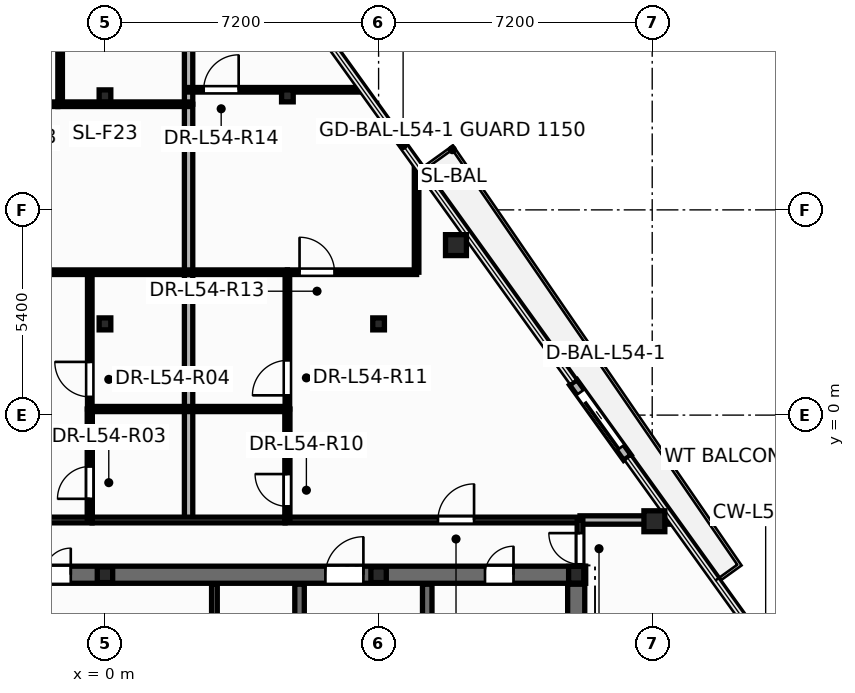
"""IFC4 building model, lengths in metres.
Left out: names, types, materials, properties, quantities, classifications, styles, units other than length and angle.
Written with IfcOpenShell. Run it as: python <this file> out.ifc"""

import sys

from ifc_helpers import new_model, si_unit, direction, frame, frame_2d, origin, origin_2d, place, context, subcontext, project, spatial, rectangle, hollow_circle, i_section, extrude, element, fill, save


model = new_model("IFC4")
c1 = context("Model", 3, precision=1e-05, world=origin(), true_north=direction((0.0, 1.0)))
c2 = subcontext(c1, "Body", "Model", "MODEL_VIEW")
j1 = project(units=[si_unit("LENGTHUNIT", "METRE"), si_unit("PLANEANGLEUNIT", "RADIAN")], contexts=[c1])
p1 = place(None, origin())
s1 = spatial("IfcSite", under=j1, at=p1, CompositionType="ELEMENT")
p2 = place(p1, origin())
s2 = spatial("IfcBuilding", under=s1, at=p2, CompositionType="ELEMENT")
p3 = place(p2, frame((0.0, 0.0, 207.3)))
s3 = spatial("IfcBuildingStorey", under=s2, at=p3, CompositionType="ELEMENT", Elevation=207.3)
for number, where, z_axis, x_axis in (
    (1, (14.457, -2.793, 0.0), (0.0, 0.0, 1.0), (1.0, 0.0, 0.0)),
    (2, (9.236, 4.473, 0.0), (0.0, 0.0, 1.0), (1.0, 0.0, 0.0)),
):
    element("IfcColumn", number, at=place(p3, frame(where, z_axis=z_axis, x_axis=x_axis)), inside=s3, PredefinedType="COLUMN", context=c2, shape_type="SweptSolid", body=[
        extrude(hollow_circle(Radius=0.275, WallThickness=0.024, at=origin_2d()), origin(), (0.0, 0.0, 1.0), 3.6),
    ])
p4 = place(p3, frame((12.4, -4.2, 0.0), z_axis=(0.0, 0.0, 1.0), x_axis=(1.0, 0.0, 0.0)))
e3 = element("IfcColumn", 3, at=p4, inside=s3, PredefinedType="COLUMN", context=c2, shape_type="SweptSolid", body=[
    extrude(i_section(OverallWidth=0.4, OverallDepth=0.44, WebThickness=0.028, FlangeThickness=0.04, at=origin_2d()), origin(), (0.0, 0.0, 1.0), 3.6),
])
for number, where, z_axis, x_axis in (
    (4, (0.0, -4.2, 0.0), (0.0, 0.0, 1.0), (1.0, 0.0, 0.0)),
    (5, (7.2, -4.2, 0.0), (0.0, 0.0, 1.0), (1.0, 0.0, 0.0)),
):
    element("IfcColumn", number, at=place(p3, frame(where, z_axis=z_axis, x_axis=x_axis)), inside=s3, PredefinedType="PILASTER", context=c2, shape_type="SweptSolid", body=[
        extrude(i_section(OverallWidth=0.405, OverallDepth=0.414, WebThickness=0.022, FlangeThickness=0.032, at=origin_2d()), origin(), (0.0, 0.0, 1.0), 3.6),
    ])
for number, where, z_axis, x_axis in (
    (6, (0.0, 2.4, 0.0), (0.0, 0.0, 1.0), (1.0, 0.0, 0.0)),
    (7, (7.2, 2.4, 0.0), (0.0, 0.0, 1.0), (1.0, 0.0, 0.0)),
    (8, (0.0, 8.4, 0.0), (0.0, 0.0, 1.0), (1.0, 0.0, 0.0)),
    (9, (4.8, 8.4, 0.0), (0.0, 0.0, 1.0), (1.0, 0.0, 0.0)),
):
    element("IfcColumn", number, at=place(p3, frame(where, z_axis=z_axis, x_axis=x_axis)), inside=s3, PredefinedType="COLUMN", context=c2, shape_type="SweptSolid", body=[
        extrude(i_section(OverallWidth=0.307, OverallDepth=0.314, WebThickness=0.012, FlangeThickness=0.019, at=origin_2d()), origin(), (0.0, 0.0, 1.0), 3.6),
    ])
p5 = place(p3, frame((13.747, -1.12, -0.015), z_axis=(0.0, 0.0, 1.0), x_axis=(-0.58349791381, 0.812114637585, 0.0)))
e10 = element("IfcWall", 10, at=p5, inside=s3, PredefinedType="STANDARD", context=c2, shape_type="SweptSolid", body=[
    extrude(rectangle(XDim=2.44, YDim=0.24, at=frame_2d((1.22, 0.0))), origin(), (0.0, 0.0, 1.0), 2.802),
])
p6 = place(p5, frame((0.32, 0.0, 0.015)))
e11 = element("IfcOpeningElement", 11, at=p6, cuts=e10, PredefinedType="OPENING", context=c2, shape_type="SweptSolid", body=[
    extrude(rectangle(XDim=1.806, YDim=2.204, at=frame_2d((0.9, 1.102))), frame((0.0, 0.13, 0.0), z_axis=(0.0, -1.0, 0.0), x_axis=(1.0, 0.0, 0.0)), (0.0, 0.0, 1.0), 0.26),
])
p7 = place(p3, frame((2.88, -5.6, 0.0), z_axis=(0.0, 0.0, 1.0), x_axis=(0.0, 1.0, 0.0)))
e12 = element("IfcWall", 12, at=p7, inside=s3, PredefinedType="PARTITIONING", context=c2, shape_type="SweptSolid", body=[
    extrude(rectangle(XDim=1.15, YDim=0.15, at=frame_2d((0.575, 0.0))), origin(), (0.0, 0.0, 1.0), 3.345),
])
p8 = place(p3, frame((-12.65, -4.2, 0.0), z_axis=(0.0, 0.0, 1.0), x_axis=(1.0, 0.0, 0.0)))
e13 = element("IfcWall", 13, at=p8, inside=s3, PredefinedType="SHEAR", context=c2, shape_type="SweptSolid", body=[
    extrude(rectangle(XDim=25.3, YDim=0.45, at=frame_2d((12.65, 0.0))), origin(), (0.0, 0.0, 1.0), 3.6),
])
p9 = place(p8, frame((1.85, 0.0, 0.0)))
e14 = element("IfcOpeningElement", 14, at=p9, cuts=e13, PredefinedType="OPENING", context=c2, shape_type="SweptSolid", body=[
    extrude(rectangle(XDim=0.756, YDim=2.054, at=frame_2d((0.375, 1.027))), frame((0.0, 0.235, 0.0), z_axis=(0.0, -1.0, 0.0), x_axis=(1.0, 0.0, 0.0)), (0.0, 0.0, 1.0), 0.47),
])
p10 = place(p8, frame((22.65, 0.0, 0.0)))
e15 = element("IfcOpeningElement", 15, at=p10, cuts=e13, PredefinedType="OPENING", context=c2, shape_type="SweptSolid", body=[
    extrude(rectangle(XDim=0.756, YDim=2.054, at=frame_2d((0.375, 1.027))), frame((0.0, 0.235, 0.0), z_axis=(0.0, -1.0, 0.0), x_axis=(1.0, 0.0, 0.0)), (0.0, 0.0, 1.0), 0.47),
])
p11 = place(p8, frame((5.85, 0.0, 0.0)))
e16 = element("IfcOpeningElement", 16, at=p11, cuts=e13, PredefinedType="OPENING", context=c2, shape_type="SweptSolid", body=[
    extrude(rectangle(XDim=1.006, YDim=2.104, at=frame_2d((0.5, 1.052))), frame((0.0, 0.235, 0.0), z_axis=(0.0, -1.0, 0.0), x_axis=(1.0, 0.0, 0.0)), (0.0, 0.0, 1.0), 0.47),
])
p12 = place(p8, frame((10.35, 0.0, 0.0)))
e17 = element("IfcOpeningElement", 17, at=p12, cuts=e13, PredefinedType="OPENING", context=c2, shape_type="SweptSolid", body=[
    extrude(rectangle(XDim=1.406, YDim=2.154, at=frame_2d((0.7, 1.077))), frame((0.0, 0.235, 0.0), z_axis=(0.0, -1.0, 0.0), x_axis=(1.0, 0.0, 0.0)), (0.0, 0.0, 1.0), 0.47),
])
p13 = place(p8, frame((18.45, 0.0, 0.0)))
e18 = element("IfcOpeningElement", 18, at=p13, cuts=e13, PredefinedType="OPENING", context=c2, shape_type="SweptSolid", body=[
    extrude(rectangle(XDim=1.006, YDim=2.104, at=frame_2d((0.5, 1.052))), frame((0.0, 0.235, 0.0), z_axis=(0.0, -1.0, 0.0), x_axis=(1.0, 0.0, 0.0)), (0.0, 0.0, 1.0), 0.47),
])
p14 = place(p3, frame((8.48, -13.85, 0.0), z_axis=(0.0, 0.0, 1.0), x_axis=(0.0, 1.0, 0.0)))
e19 = element("IfcWall", 19, at=p14, inside=s3, PredefinedType="SHEAR", context=c2, shape_type="SweptSolid", body=[
    extrude(rectangle(XDim=9.4, YDim=0.25, at=frame_2d((4.7, 0.0))), origin(), (0.0, 0.0, 1.0), 3.6),
])
p15 = place(p14, frame((6.95, 0.0, 0.0)))
e20 = element("IfcOpeningElement", 20, at=p15, cuts=e19, PredefinedType="OPENING", context=c2, shape_type="SweptSolid", body=[
    extrude(rectangle(XDim=1.006, YDim=2.104, at=frame_2d((0.5, 1.052))), frame((0.0, 0.135, 0.0), z_axis=(0.0, -1.0, 0.0), x_axis=(1.0, 0.0, 0.0)), (0.0, 0.0, 1.0), 0.27),
])
p16 = place(p3, frame((5.12, -13.85, 0.0), z_axis=(0.0, 0.0, 1.0), x_axis=(0.0, 1.0, 0.0)))
e21 = element("IfcWall", 21, at=p16, inside=s3, PredefinedType="SHEAR", context=c2, shape_type="SweptSolid", body=[
    extrude(rectangle(XDim=9.4, YDim=0.25, at=frame_2d((4.7, 0.0))), origin(), (0.0, 0.0, 1.0), 3.6),
])
p17 = place(p3, frame((12.4, -13.85, 0.0), z_axis=(0.0, 0.0, 1.0), x_axis=(0.0, 1.0, 0.0)))
e22 = element("IfcWall", 22, at=p17, inside=s3, PredefinedType="SHEAR", context=c2, shape_type="SweptSolid", body=[
    extrude(rectangle(XDim=9.4, YDim=0.45, at=frame_2d((4.7, 0.0))), origin(), (0.0, 0.0, 1.0), 3.6),
])
p18 = place(p3, frame((-12.5, -2.76, 0.0), z_axis=(0.0, 0.0, 1.0), x_axis=(1.0, 0.0, 0.0)))
e23 = element("IfcWall", 23, at=p18, inside=s3, PredefinedType="PARTITIONING", context=c2, shape_type="SweptSolid", body=[
    extrude(rectangle(XDim=12.16, YDim=0.15, at=frame_2d((6.08, 0.0))), origin(), (0.0, 0.0, 1.0), 2.32),
])
p19 = place(p18, frame((1.676, 0.0, 0.0)))
e24 = element("IfcOpeningElement", 24, at=p19, cuts=e23, PredefinedType="OPENING", context=c2, shape_type="SweptSolid", body=[
    extrude(rectangle(XDim=0.956, YDim=2.104, at=frame_2d((0.475, 1.052))), frame((0.0, 0.085, 0.0), z_axis=(0.0, -1.0, 0.0), x_axis=(1.0, 0.0, 0.0)), (0.0, 0.0, 1.0), 0.17),
])
p20 = place(p3, frame((4.74, -2.76, 0.0), z_axis=(0.0, 0.0, 1.0), x_axis=(1.0, 0.0, 0.0)))
e25 = element("IfcWall", 25, at=p20, inside=s3, PredefinedType="PARTITIONING", context=c2, shape_type="SweptSolid", body=[
    extrude(rectangle(XDim=7.76, YDim=0.15, at=frame_2d((3.88, 0.0))), origin(), (0.0, 0.0, 1.0), 2.32),
])
p21 = place(p20, frame((4.022, 0.0, 0.0)))
e26 = element("IfcOpeningElement", 26, at=p21, cuts=e25, PredefinedType="OPENING", context=c2, shape_type="SweptSolid", body=[
    extrude(rectangle(XDim=0.956, YDim=2.104, at=frame_2d((0.475, 1.052))), frame((0.0, 0.085, 0.0), z_axis=(0.0, -1.0, 0.0), x_axis=(1.0, 0.0, 0.0)), (0.0, 0.0, 1.0), 0.17),
])
p22 = place(p3, frame((-1.18, 8.18, 0.0), z_axis=(0.0, 0.0, 1.0), x_axis=(0.0, 1.0, 0.0)))
e27 = element("IfcWall", 27, at=p22, inside=s3, PredefinedType="PARTITIONING", context=c2, shape_type="SweptSolid", body=[
    extrude(rectangle(XDim=5.17, YDim=0.12, at=frame_2d((2.585, 0.0))), origin(), (0.0, 0.0, 1.0), 2.62),
])
p23 = place(p22, frame((1.875, 0.0, 0.0)))
e28 = element("IfcOpeningElement", 28, at=p23, cuts=e27, PredefinedType="OPENING", context=c2, shape_type="SweptSolid", body=[
    extrude(rectangle(XDim=0.926, YDim=2.104, at=frame_2d((0.46, 1.052))), frame((0.0, 0.07, 0.0), z_axis=(0.0, -1.0, 0.0), x_axis=(1.0, 0.0, 0.0)), (0.0, 0.0, 1.0), 0.14),
])
p24 = place(p3, frame((2.2, 8.18, 0.0), z_axis=(0.0, 0.0, 1.0), x_axis=(0.0, 1.0, 0.0)))
e29 = element("IfcWall", 29, at=p24, inside=s3, PredefinedType="PARTITIONING", context=c2, shape_type="SweptSolid", body=[
    extrude(rectangle(XDim=5.17, YDim=0.22, at=frame_2d((2.585, 0.0))), origin(), (0.0, 0.0, 1.0), 2.62),
])
p25 = place(p3, frame((2.2, 8.56, 0.0), z_axis=(0.0, 0.0, 1.0), x_axis=(1.0, 0.0, 0.0)))
e30 = element("IfcWall", 30, at=p25, inside=s3, PredefinedType="PARTITIONING", context=c2, shape_type="SweptSolid", body=[
    extrude(rectangle(XDim=4.592, YDim=0.12, at=frame_2d((2.296, 0.0))), origin(), (0.0, 0.0, 1.0), 2.62),
])
p26 = place(p25, frame((0.398, 0.0, 0.0)))
e31 = element("IfcOpeningElement", 31, at=p26, cuts=e30, PredefinedType="OPENING", context=c2, shape_type="SweptSolid", body=[
    extrude(rectangle(XDim=0.926, YDim=2.104, at=frame_2d((0.46, 1.052))), frame((0.0, 0.07, 0.0), z_axis=(0.0, -1.0, 0.0), x_axis=(1.0, 0.0, 0.0)), (0.0, 0.0, 1.0), 0.14),
])
p27 = place(p3, frame((2.2, -2.76, 0.0), z_axis=(0.0, 0.0, 1.0), x_axis=(0.0, 1.0, 0.0)))
e32 = element("IfcWall", 32, at=p27, inside=s3, PredefinedType="PARTITIONING", context=c2, shape_type="SweptSolid", body=[
    extrude(rectangle(XDim=10.94, YDim=0.22, at=frame_2d((5.47, 0.0))), origin(), (0.0, 0.0, 1.0), 2.32),
])
p28 = place(p3, frame((-3.978, 3.76, 0.0), z_axis=(0.0, 0.0, 1.0), x_axis=(1.0, 0.0, 0.0)))
e33 = element("IfcWall", 33, at=p28, inside=s3, PredefinedType="PARTITIONING", context=c2, shape_type="SweptSolid", body=[
    extrude(rectangle(XDim=8.778, YDim=0.12, at=frame_2d((4.389, 0.0))), origin(), (0.0, 0.0, 1.0), 2.32),
])
p29 = place(p3, frame((-0.4, 0.16, 0.0), z_axis=(0.0, 0.0, 1.0), x_axis=(0.0, 1.0, 0.0)))
e34 = element("IfcWall", 34, at=p29, inside=s3, PredefinedType="PARTITIONING", context=c2, shape_type="SweptSolid", body=[
    extrude(rectangle(XDim=3.6, YDim=0.12, at=frame_2d((1.8, 0.0))), origin(), (0.0, 0.0, 1.0), 2.32),
])
p30 = place(p29, frame((0.32, 0.0, 0.0)))
e35 = element("IfcOpeningElement", 35, at=p30, cuts=e34, PredefinedType="OPENING", context=c2, shape_type="SweptSolid", body=[
    extrude(rectangle(XDim=0.926, YDim=2.104, at=frame_2d((0.46, 1.052))), frame((0.0, 0.07, 0.0), z_axis=(0.0, -1.0, 0.0), x_axis=(1.0, 0.0, 0.0)), (0.0, 0.0, 1.0), 0.14),
])
p31 = place(p3, frame((4.8, 0.16, 0.0), z_axis=(0.0, 0.0, 1.0), x_axis=(0.0, 1.0, 0.0)))
e36 = element("IfcWall", 36, at=p31, inside=s3, PredefinedType="PARTITIONING", context=c2, shape_type="SweptSolid", body=[
    extrude(rectangle(XDim=3.6, YDim=0.12, at=frame_2d((1.8, 0.0))), origin(), (0.0, 0.0, 1.0), 2.32),
])
p32 = place(p31, frame((0.36, 0.0, 0.0)))
e37 = element("IfcOpeningElement", 37, at=p32, cuts=e36, PredefinedType="OPENING", context=c2, shape_type="SweptSolid", body=[
    extrude(rectangle(XDim=0.926, YDim=2.104, at=frame_2d((0.46, 1.052))), frame((0.0, 0.07, 0.0), z_axis=(0.0, -1.0, 0.0), x_axis=(1.0, 0.0, 0.0)), (0.0, 0.0, 1.0), 0.14),
])
p33 = place(p3, frame((-1.24, 8.18, 0.0), z_axis=(0.0, 0.0, 1.0), x_axis=(1.0, 0.0, 0.0)))
e38 = element("IfcWall", 38, at=p33, inside=s3, PredefinedType="PARTITIONING", context=c2, shape_type="SweptSolid", body=[
    extrude(rectangle(XDim=3.44, YDim=0.12, at=frame_2d((1.72, 0.0))), origin(), (0.0, 0.0, 1.0), 2.32),
])
p34 = place(p3, frame((4.8, 3.76, 0.0), z_axis=(0.0, 0.0, 1.0), x_axis=(1.0, 0.0, 0.0)))
e39 = element("IfcWall", 39, at=p34, inside=s3, PredefinedType="PARTITIONING", context=c2, shape_type="SweptSolid", body=[
    extrude(rectangle(XDim=3.4, YDim=0.12, at=frame_2d((1.7, 0.0))), origin(), (0.0, 0.0, 1.0), 2.62),
])
p35 = place(p34, frame((0.32, 0.0, 0.0)))
e40 = element("IfcOpeningElement", 40, at=p35, cuts=e39, PredefinedType="OPENING", context=c2, shape_type="SweptSolid", body=[
    extrude(rectangle(XDim=0.926, YDim=2.104, at=frame_2d((0.46, 1.052))), frame((0.0, 0.07, 0.0), z_axis=(0.0, -1.0, 0.0), x_axis=(1.0, 0.0, 0.0)), (0.0, 0.0, 1.0), 0.14),
])
p36 = place(p3, frame((-0.4, -2.76, 0.0), z_axis=(0.0, 0.0, 1.0), x_axis=(0.0, 1.0, 0.0)))
e41 = element("IfcWall", 41, at=p36, inside=s3, PredefinedType="PARTITIONING", context=c2, shape_type="SweptSolid", body=[
    extrude(rectangle(XDim=2.92, YDim=0.135, at=frame_2d((1.46, 0.0))), origin(), (0.0, 0.0, 1.0), 3.345),
])
p37 = place(p36, frame((0.558, 0.0, 0.0)))
e42 = element("IfcOpeningElement", 42, at=p37, cuts=e41, PredefinedType="OPENING", context=c2, shape_type="SweptSolid", body=[
    extrude(rectangle(XDim=0.856, YDim=2.104, at=frame_2d((0.425, 1.052))), frame((0.0, 0.078, 0.0), z_axis=(0.0, -1.0, 0.0), x_axis=(1.0, 0.0, 0.0)), (0.0, 0.0, 1.0), 0.155),
])
p38 = place(p3, frame((-4.04, 8.18, 0.0), z_axis=(0.0, 0.0, 1.0), x_axis=(1.0, 0.0, 0.0)))
e43 = element("IfcWall", 43, at=p38, inside=s3, PredefinedType="PARTITIONING", context=c2, shape_type="SweptSolid", body=[
    extrude(rectangle(XDim=2.798, YDim=0.12, at=frame_2d((1.399, 0.0))), origin(), (0.0, 0.0, 1.0), 2.62),
])
p39 = place(p38, frame((1.2, 0.0, 0.0)))
e44 = element("IfcOpeningElement", 44, at=p39, cuts=e43, PredefinedType="OPENING", context=c2, shape_type="SweptSolid", body=[
    extrude(rectangle(XDim=0.926, YDim=2.104, at=frame_2d((0.46, 1.052))), frame((0.0, 0.07, 0.0), z_axis=(0.0, -1.0, 0.0), x_axis=(1.0, 0.0, 0.0)), (0.0, 0.0, 1.0), 0.14),
])
p40 = place(p3, frame((4.8, -2.76, 0.0), z_axis=(0.0, 0.0, 1.0), x_axis=(0.0, 1.0, 0.0)))
e45 = element("IfcWall", 45, at=p40, inside=s3, PredefinedType="PARTITIONING", context=c2, shape_type="SweptSolid", body=[
    extrude(rectangle(XDim=2.92, YDim=0.135, at=frame_2d((1.46, 0.0))), origin(), (0.0, 0.0, 1.0), 3.345),
])
p41 = place(p40, frame((0.359, 0.0, 0.0)))
e46 = element("IfcOpeningElement", 46, at=p41, cuts=e45, PredefinedType="OPENING", context=c2, shape_type="SweptSolid", body=[
    extrude(rectangle(XDim=0.856, YDim=2.104, at=frame_2d((0.425, 1.052))), frame((0.0, 0.078, 0.0), z_axis=(0.0, -1.0, 0.0), x_axis=(1.0, 0.0, 0.0)), (0.0, 0.0, 1.0), 0.155),
])
p42 = place(p3, frame((8.2, 3.76, 0.0), z_axis=(0.0, 0.0, 1.0), x_axis=(0.0, 1.0, 0.0)))
e47 = element("IfcWall", 47, at=p42, inside=s3, PredefinedType="PARTITIONING", context=c2, shape_type="SweptSolid", body=[
    extrude(rectangle(XDim=2.84, YDim=0.12, at=frame_2d((1.42, 0.0))), origin(), (0.0, 0.0, 1.0), 2.62),
])
p43 = place(p3, frame((-0.338, -2.76, 0.0), z_axis=(0.0, 0.0, 1.0), x_axis=(1.0, 0.0, 0.0)))
e48 = element("IfcWall", 48, at=p43, inside=s3, PredefinedType="PARTITIONING", context=c2, shape_type="SweptSolid", body=[
    extrude(rectangle(XDim=5.076, YDim=0.15, at=frame_2d((2.538, 0.0))), origin(), (0.0, 0.0, 1.0), 2.32),
])
p44 = place(p3, frame((-0.4, 0.16, 0.0), z_axis=(0.0, 0.0, 1.0), x_axis=(1.0, 0.0, 0.0)))
e49 = element("IfcWall", 49, at=p44, inside=s3, PredefinedType="PARTITIONING", context=c2, shape_type="SweptSolid", body=[
    extrude(rectangle(XDim=5.2, YDim=0.135, at=frame_2d((2.6, 0.0))), origin(), (0.0, 0.0, 1.0), 2.32),
])
p45 = place(p3, frame((12.5, -2.76, 0.0), z_axis=(0.0, 0.0, 1.0), x_axis=(1.0, 0.0, 0.0)))
e50 = element("IfcWall", 50, at=p45, inside=s3, PredefinedType="PARTITIONING", context=c2, shape_type="SweptSolid", body=[
    extrude(rectangle(XDim=2.426, YDim=0.22, at=frame_2d((1.213, 0.0))), origin(), (0.0, 0.0, 1.0), 2.62),
])
p46 = place(p3, frame((12.5, -4.24, 0.0), z_axis=(0.0, 0.0, 1.0), x_axis=(0.0, 1.0, 0.0)))
e51 = element("IfcWall", 51, at=p46, inside=s3, PredefinedType="PARTITIONING", context=c2, shape_type="SweptSolid", body=[
    extrude(rectangle(XDim=1.48, YDim=0.15, at=frame_2d((0.74, 0.0))), origin(), (0.0, 0.0, 1.0), 2.32),
])
p47 = place(p46, frame((0.315, 0.0, 0.0)))
e52 = element("IfcOpeningElement", 52, at=p47, cuts=e51, PredefinedType="OPENING", context=c2, shape_type="SweptSolid", body=[
    extrude(rectangle(XDim=0.826, YDim=2.104, at=frame_2d((0.41, 1.052))), frame((0.0, 0.085, 0.0), z_axis=(0.0, -1.0, 0.0), x_axis=(1.0, 0.0, 0.0)), (0.0, 0.0, 1.0), 0.17),
])
p48 = place(p6, origin())
e53 = element("IfcDoor", 53, at=p48, inside=s3, OperationType="SLIDING_TO_LEFT", PredefinedType="DOOR", context=c2, shape_type="SweptSolid", body=[
    extrude(rectangle(XDim=1.8, YDim=2.2, at=frame_2d((0.9, 1.1))), frame((0.0, 0.025, 0.0), z_axis=(0.0, -1.0, 0.0), x_axis=(1.0, 0.0, 0.0)), (0.0, 0.0, 1.0), 0.05),
])
fill(e11, e53)
p49 = place(p10, origin())
e54 = element("IfcDoor", 54, at=p49, inside=s3, OperationType="SINGLE_SWING_RIGHT", PredefinedType="DOOR", context=c2, shape_type="SweptSolid", body=[
    extrude(rectangle(XDim=0.75, YDim=2.05, at=frame_2d((0.375, 1.025))), frame((0.0, 0.025, 0.0), z_axis=(0.0, -1.0, 0.0), x_axis=(1.0, 0.0, 0.0)), (0.0, 0.0, 1.0), 0.05),
])
fill(e15, e54)
p50 = place(p12, origin())
e55 = element("IfcDoor", 55, at=p50, inside=s3, OperationType="DOUBLE_DOOR_SINGLE_SWING", PredefinedType="DOOR", context=c2, shape_type="SweptSolid", body=[
    extrude(rectangle(XDim=1.4, YDim=2.15, at=frame_2d((0.7, 1.075))), frame((0.0, 0.025, 0.0), z_axis=(0.0, -1.0, 0.0), x_axis=(1.0, 0.0, 0.0)), (0.0, 0.0, 1.0), 0.05),
])
fill(e17, e55)
p51 = place(p13, origin())
e56 = element("IfcDoor", 56, at=p51, inside=s3, OperationType="SINGLE_SWING_RIGHT", PredefinedType="DOOR", context=c2, shape_type="SweptSolid", body=[
    extrude(rectangle(XDim=1.0, YDim=2.1, at=frame_2d((0.5, 1.05))), frame((0.0, 0.025, 0.0), z_axis=(0.0, -1.0, 0.0), x_axis=(1.0, 0.0, 0.0)), (0.0, 0.0, 1.0), 0.05),
])
fill(e18, e56)
p52 = place(p47, origin())
e57 = element("IfcDoor", 57, at=p52, inside=s3, OperationType="SINGLE_SWING_RIGHT", PredefinedType="DOOR", context=c2, shape_type="SweptSolid", body=[
    extrude(rectangle(XDim=0.82, YDim=2.1, at=frame_2d((0.41, 1.05))), frame((0.0, 0.025, 0.0), z_axis=(0.0, -1.0, 0.0), x_axis=(1.0, 0.0, 0.0)), (0.0, 0.0, 1.0), 0.05),
])
fill(e52, e57)
p53 = place(p37, origin())
e58 = element("IfcDoor", 58, at=p53, inside=s3, OperationType="SINGLE_SWING_LEFT", PredefinedType="DOOR", context=c2, shape_type="SweptSolid", body=[
    extrude(rectangle(XDim=0.85, YDim=2.1, at=frame_2d((0.425, 1.05))), frame((0.0, 0.025, 0.0), z_axis=(0.0, -1.0, 0.0), x_axis=(1.0, 0.0, 0.0)), (0.0, 0.0, 1.0), 0.05),
])
fill(e42, e58)
p54 = place(p30, origin())
e59 = element("IfcDoor", 59, at=p54, inside=s3, OperationType="SINGLE_SWING_RIGHT", PredefinedType="DOOR", context=c2, shape_type="SweptSolid", body=[
    extrude(rectangle(XDim=0.92, YDim=2.1, at=frame_2d((0.46, 1.05))), frame((0.0, 0.025, 0.0), z_axis=(0.0, -1.0, 0.0), x_axis=(1.0, 0.0, 0.0)), (0.0, 0.0, 1.0), 0.05),
])
fill(e35, e59)
p55 = place(p41, origin())
e60 = element("IfcDoor", 60, at=p55, inside=s3, OperationType="SINGLE_SWING_RIGHT", PredefinedType="DOOR", context=c2, shape_type="SweptSolid", body=[
    extrude(rectangle(XDim=0.85, YDim=2.1, at=frame_2d((0.425, 1.05))), frame((0.0, 0.025, 0.0), z_axis=(0.0, -1.0, 0.0), x_axis=(1.0, 0.0, 0.0)), (0.0, 0.0, 1.0), 0.05),
])
fill(e46, e60)
p56 = place(p32, origin())
e61 = element("IfcDoor", 61, at=p56, inside=s3, OperationType="SINGLE_SWING_LEFT", PredefinedType="DOOR", context=c2, shape_type="SweptSolid", body=[
    extrude(rectangle(XDim=0.92, YDim=2.1, at=frame_2d((0.46, 1.05))), frame((0.0, 0.025, 0.0), z_axis=(0.0, -1.0, 0.0), x_axis=(1.0, 0.0, 0.0)), (0.0, 0.0, 1.0), 0.05),
])
fill(e37, e61)
p57 = place(p21, origin())
e62 = element("IfcDoor", 62, at=p57, inside=s3, OperationType="SINGLE_SWING_RIGHT", PredefinedType="DOOR", context=c2, shape_type="SweptSolid", body=[
    extrude(rectangle(XDim=0.95, YDim=2.1, at=frame_2d((0.475, 1.05))), frame((0.0, 0.025, 0.0), z_axis=(0.0, -1.0, 0.0), x_axis=(1.0, 0.0, 0.0)), (0.0, 0.0, 1.0), 0.05),
])
fill(e26, e62)
p58 = place(p35, origin())
e63 = element("IfcDoor", 63, at=p58, inside=s3, OperationType="SINGLE_SWING_LEFT", PredefinedType="DOOR", context=c2, shape_type="SweptSolid", body=[
    extrude(rectangle(XDim=0.92, YDim=2.1, at=frame_2d((0.46, 1.05))), frame((0.0, 0.025, 0.0), z_axis=(0.0, -1.0, 0.0), x_axis=(1.0, 0.0, 0.0)), (0.0, 0.0, 1.0), 0.05),
])
fill(e40, e63)
p59 = place(p26, origin())
e64 = element("IfcDoor", 64, at=p59, inside=s3, OperationType="SINGLE_SWING_RIGHT", PredefinedType="DOOR", context=c2, shape_type="SweptSolid", body=[
    extrude(rectangle(XDim=0.92, YDim=2.1, at=frame_2d((0.46, 1.05))), frame((0.0, 0.025, 0.0), z_axis=(0.0, -1.0, 0.0), x_axis=(1.0, 0.0, 0.0)), (0.0, 0.0, 1.0), 0.05),
])
fill(e31, e64)
save(model, sys.argv[1])
